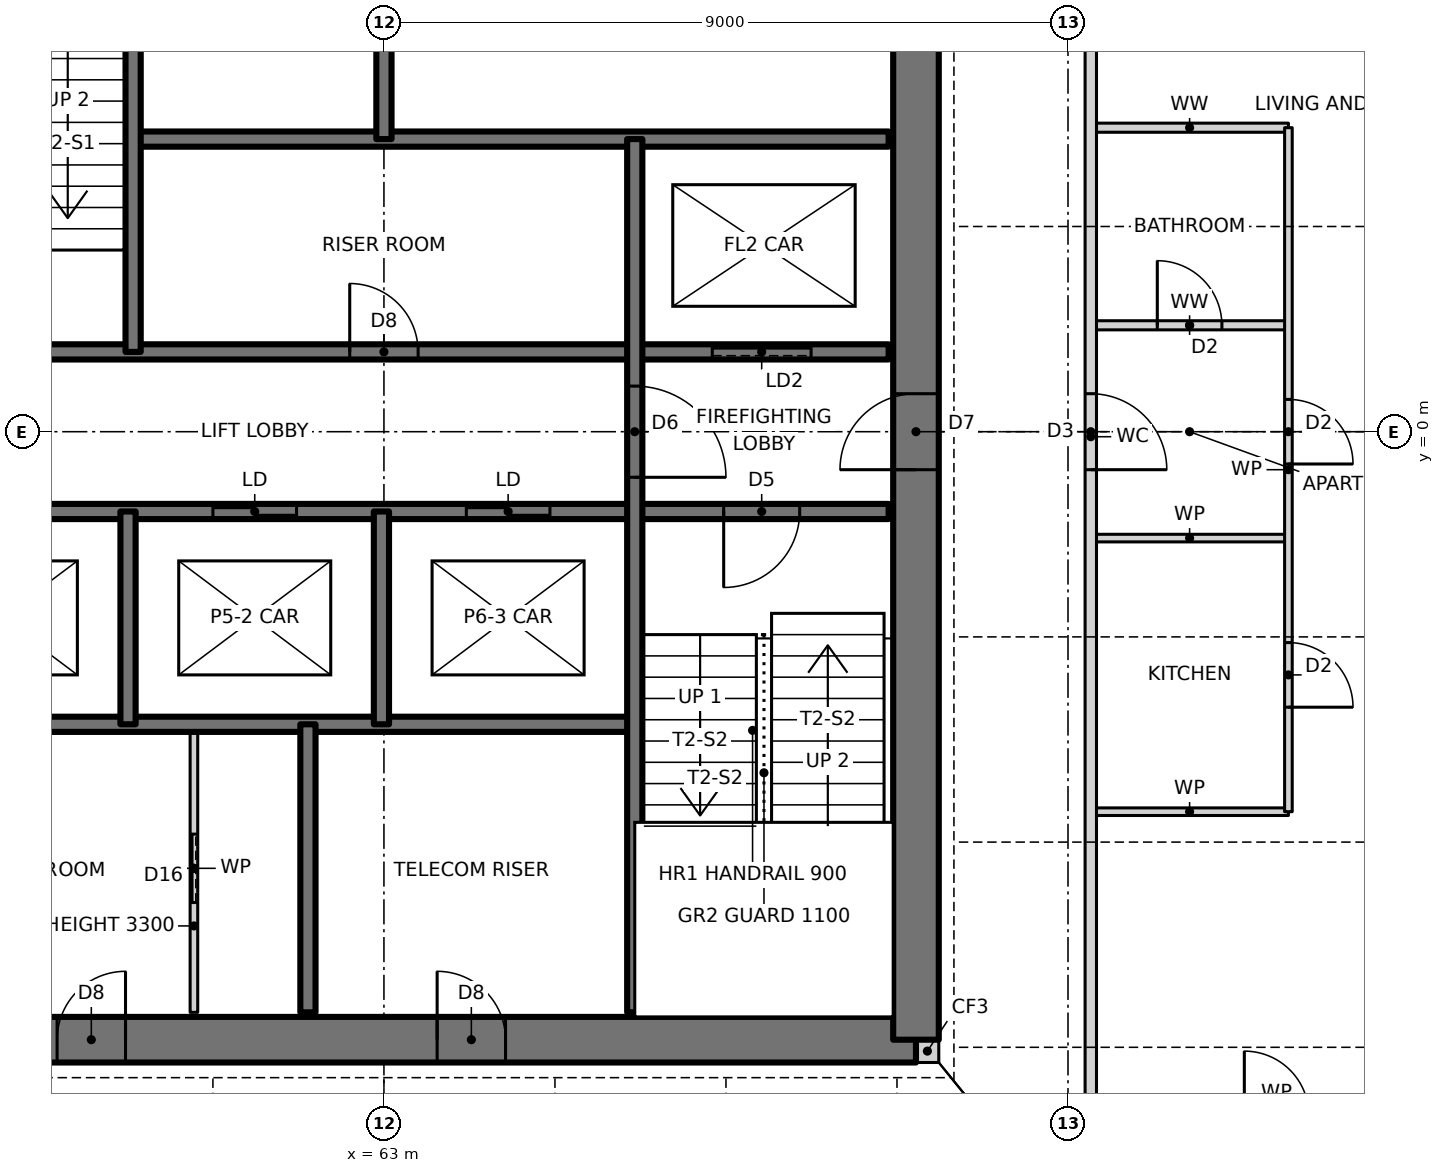
"""IFC4 building model, lengths in metres.
Left out: names, types, materials, properties, quantities, classifications, styles, units other than length and angle.
Written with IfcOpenShell. Run it as: python <this file> out.ifc"""

import sys

from ifc_helpers import new_model, si_unit, direction, frame, frame_2d, origin, place, context, subcontext, project, spatial, rectangle, extrude, element, fill, save


model = new_model("IFC4")
c1 = context("Model", 3, precision=1e-05, world=origin(), true_north=direction((0.0, 1.0)))
c2 = subcontext(c1, "Body", "Model", "MODEL_VIEW")
j1 = project(units=[si_unit("LENGTHUNIT", "METRE"), si_unit("PLANEANGLEUNIT", "RADIAN")], contexts=[c1])
p1 = place(None, origin())
s1 = spatial("IfcSite", under=j1, at=p1, CompositionType="ELEMENT")
p2 = place(p1, origin())
s2 = spatial("IfcBuilding", under=s1, at=p2, CompositionType="ELEMENT")
p3 = place(p2, frame((0.0, 0.0, 119.0)))
s3 = spatial("IfcBuildingStorey", under=s2, at=p3, CompositionType="ELEMENT", Elevation=119.0)
p4 = place(p3, frame((70.0, -8.15, 0.0), z_axis=(0.0, 0.0, 1.0), x_axis=(1.0, 0.0, 0.0)))
e1 = element("IfcWall", 1, at=p4, inside=s3, PredefinedType="SOLIDWALL", context=c2, shape_type="SweptSolid", body=[
    extrude(rectangle(XDim=0.3, YDim=0.3, at=frame_2d((0.15, 0.0))), origin(), (0.0, 0.0, 1.0), 3.5),
])
p5 = place(p3, frame((56.0, -8.0, 0.0), z_axis=(0.0, 0.0, 1.0), x_axis=(1.0, 0.0, 0.0)))
e2 = element("IfcWall", 2, at=p5, inside=s3, PredefinedType="SHEAR", context=c2, shape_type="SweptSolid", body=[
    extrude(rectangle(XDim=14.0, YDim=0.6, at=frame_2d((7.0, 0.0))), origin(), (0.0, 0.0, 1.0), 3.5),
])
p6 = place(p5, frame((2.7, 0.0, 0.0)))
e3 = element("IfcOpeningElement", 3, at=p6, cuts=e2, PredefinedType="OPENING", context=c2, shape_type="SweptSolid", body=[
    extrude(rectangle(XDim=0.9, YDim=2.1, at=frame_2d((0.45, 1.05))), frame((0.0, 0.31, 0.0), z_axis=(0.0, -1.0, 0.0), x_axis=(1.0, 0.0, 0.0)), (0.0, 0.0, 1.0), 0.62),
])
p7 = place(p5, frame((7.7, 0.0, 0.0)))
e4 = element("IfcOpeningElement", 4, at=p7, cuts=e2, PredefinedType="OPENING", context=c2, shape_type="SweptSolid", body=[
    extrude(rectangle(XDim=0.9, YDim=2.1, at=frame_2d((0.45, 1.05))), frame((0.0, 0.31, 0.0), z_axis=(0.0, -1.0, 0.0), x_axis=(1.0, 0.0, 0.0)), (0.0, 0.0, 1.0), 0.62),
])
p8 = place(p3, frame((70.0, -8.0, 0.0), z_axis=(0.0, 0.0, 1.0), x_axis=(0.0, 1.0, 0.0)))
e5 = element("IfcWall", 5, at=p8, inside=s3, PredefinedType="SHEAR", context=c2, shape_type="SweptSolid", body=[
    extrude(rectangle(XDim=16.0, YDim=0.6, at=frame_2d((8.0, 0.0))), origin(), (0.0, 0.0, 1.0), 3.5),
])
p9 = place(p8, frame((7.5, 0.0, 0.0)))
e6 = element("IfcOpeningElement", 6, at=p9, cuts=e5, PredefinedType="OPENING", context=c2, shape_type="SweptSolid", body=[
    extrude(rectangle(XDim=1.0, YDim=2.1, at=frame_2d((0.5, 1.05))), frame((0.0, 0.31, 0.0), z_axis=(0.0, -1.0, 0.0), x_axis=(1.0, 0.0, 0.0)), (0.0, 0.0, 1.0), 0.62),
])
p10 = place(p3, frame((72.3, -5.0, 0.0), z_axis=(0.0, 0.0, 1.0), x_axis=(1.0, 0.0, 0.0)))
e7 = element("IfcWall", 7, at=p10, inside=s3, PredefinedType="PARTITIONING", context=c2, shape_type="SweptSolid", body=[
    extrude(rectangle(XDim=2.6, YDim=0.1, at=frame_2d((1.3, 0.0))), origin(), (0.0, 0.0, 1.0), 3.27),
])
p11 = place(p3, frame((56.36, -3.85, 0.0), z_axis=(0.0, 0.0, 1.0), x_axis=(1.0, 0.0, 0.0)))
e8 = element("IfcWall", 8, at=p11, inside=s3, PredefinedType="SOLIDWALL", context=c2, shape_type="SweptSolid", body=[
    extrude(rectangle(XDim=9.94, YDim=0.2, at=frame_2d((4.97, 0.0))), origin(), (0.0, 0.0, 1.0), 3.5),
])
p12 = place(p3, frame((72.3, -1.4, 0.0), z_axis=(0.0, 0.0, 1.0), x_axis=(1.0, 0.0, 0.0)))
e9 = element("IfcWall", 9, at=p12, inside=s3, PredefinedType="PARTITIONING", context=c2, shape_type="SweptSolid", body=[
    extrude(rectangle(XDim=2.6, YDim=0.1, at=frame_2d((1.3, 0.0))), origin(), (0.0, 0.0, 1.0), 3.27),
])
p13 = place(p3, frame((56.36, -1.05, 0.0), z_axis=(0.0, 0.0, 1.0), x_axis=(1.0, 0.0, 0.0)))
e10 = element("IfcWall", 10, at=p13, inside=s3, PredefinedType="SOLIDWALL", context=c2, shape_type="SweptSolid", body=[
    extrude(rectangle(XDim=13.28, YDim=0.2, at=frame_2d((6.64, 0.0))), origin(), (0.0, 0.0, 1.0), 3.5),
])
p14 = place(p13, frame((11.11, 0.0, 0.0)))
e11 = element("IfcOpeningElement", 11, at=p14, cuts=e10, PredefinedType="OPENING", context=c2, shape_type="SweptSolid", body=[
    extrude(rectangle(XDim=1.0, YDim=2.1, at=frame_2d((0.5, 1.05))), frame((0.0, 0.11, 0.0), z_axis=(0.0, -1.0, 0.0), x_axis=(1.0, 0.0, 0.0)), (0.0, 0.0, 1.0), 0.22),
])
p15 = place(p13, frame((1.087, 0.0, 0.0)))
e12 = element("IfcOpeningElement", 12, at=p15, cuts=e10, PredefinedType="OPENING", context=c2, shape_type="SweptSolid", body=[
    extrude(rectangle(XDim=1.1, YDim=2.1, at=frame_2d((0.55, 1.05))), frame((0.0, 0.11, 0.0), z_axis=(0.0, -1.0, 0.0), x_axis=(1.0, 0.0, 0.0)), (0.0, 0.0, 1.0), 0.22),
])
p16 = place(p13, frame((4.39, 0.0, 0.0)))
e13 = element("IfcOpeningElement", 13, at=p16, cuts=e10, PredefinedType="OPENING", context=c2, shape_type="SweptSolid", body=[
    extrude(rectangle(XDim=1.1, YDim=2.1, at=frame_2d((0.55, 1.05))), frame((0.0, 0.11, 0.0), z_axis=(0.0, -1.0, 0.0), x_axis=(1.0, 0.0, 0.0)), (0.0, 0.0, 1.0), 0.22),
])
p17 = place(p13, frame((7.724, 0.0, 0.0)))
e14 = element("IfcOpeningElement", 14, at=p17, cuts=e10, PredefinedType="OPENING", context=c2, shape_type="SweptSolid", body=[
    extrude(rectangle(XDim=1.1, YDim=2.1, at=frame_2d((0.55, 1.05))), frame((0.0, 0.11, 0.0), z_axis=(0.0, -1.0, 0.0), x_axis=(1.0, 0.0, 0.0)), (0.0, 0.0, 1.0), 0.22),
])
p18 = place(p3, frame((56.36, 1.05, 0.0), z_axis=(0.0, 0.0, 1.0), x_axis=(1.0, 0.0, 0.0)))
e15 = element("IfcWall", 15, at=p18, inside=s3, PredefinedType="SOLIDWALL", context=c2, shape_type="SweptSolid", body=[
    extrude(rectangle(XDim=13.28, YDim=0.2, at=frame_2d((6.64, 0.0))), origin(), (0.0, 0.0, 1.0), 3.5),
])
p19 = place(p18, frame((1.17, 0.0, 0.0)))
e16 = element("IfcOpeningElement", 16, at=p19, cuts=e15, PredefinedType="OPENING", context=c2, shape_type="SweptSolid", body=[
    extrude(rectangle(XDim=1.0, YDim=2.1, at=frame_2d((0.5, 1.05))), frame((0.0, 0.11, 0.0), z_axis=(0.0, -1.0, 0.0), x_axis=(1.0, 0.0, 0.0)), (0.0, 0.0, 1.0), 0.22),
])
p20 = place(p18, frame((6.19, 0.0, 0.0)))
e17 = element("IfcOpeningElement", 17, at=p20, cuts=e15, PredefinedType="OPENING", context=c2, shape_type="SweptSolid", body=[
    extrude(rectangle(XDim=0.9, YDim=2.1, at=frame_2d((0.45, 1.05))), frame((0.0, 0.11, 0.0), z_axis=(0.0, -1.0, 0.0), x_axis=(1.0, 0.0, 0.0)), (0.0, 0.0, 1.0), 0.22),
])
p21 = place(p18, frame((10.96, 0.0, 0.0)))
e18 = element("IfcOpeningElement", 18, at=p21, cuts=e15, PredefinedType="OPENING", context=c2, shape_type="SweptSolid", body=[
    extrude(rectangle(XDim=1.3, YDim=2.1, at=frame_2d((0.65, 1.05))), frame((0.0, 0.11, 0.0), z_axis=(0.0, -1.0, 0.0), x_axis=(1.0, 0.0, 0.0)), (0.0, 0.0, 1.0), 0.22),
])
p22 = place(p3, frame((72.3, 1.4, 0.0), z_axis=(0.0, 0.0, 1.0), x_axis=(1.0, 0.0, 0.0)))
e19 = element("IfcWall", 19, at=p22, inside=s3, PredefinedType="PARTITIONING", context=c2, shape_type="SweptSolid", body=[
    extrude(rectangle(XDim=2.6, YDim=0.12, at=frame_2d((1.3, 0.0))), origin(), (0.0, 0.0, 1.0), 3.27),
])
p23 = place(p22, frame((0.875, 0.0, 0.0)))
e20 = element("IfcOpeningElement", 20, at=p23, cuts=e19, PredefinedType="OPENING", context=c2, shape_type="SweptSolid", body=[
    extrude(rectangle(XDim=0.85, YDim=2.1, at=frame_2d((0.425, 1.05))), frame((0.0, 0.07, 0.0), z_axis=(0.0, -1.0, 0.0), x_axis=(1.0, 0.0, 0.0)), (0.0, 0.0, 1.0), 0.14),
])
p24 = place(p3, frame((59.7, 3.85, 0.0), z_axis=(0.0, 0.0, 1.0), x_axis=(1.0, 0.0, 0.0)))
e21 = element("IfcWall", 21, at=p24, inside=s3, PredefinedType="SOLIDWALL", context=c2, shape_type="SweptSolid", body=[
    extrude(rectangle(XDim=9.94, YDim=0.2, at=frame_2d((4.97, 0.0))), origin(), (0.0, 0.0, 1.0), 3.5),
])
p25 = place(p3, frame((72.3, 4.0, 0.0), z_axis=(0.0, 0.0, 1.0), x_axis=(1.0, 0.0, 0.0)))
e22 = element("IfcWall", 22, at=p25, inside=s3, PredefinedType="PARTITIONING", context=c2, shape_type="SweptSolid", body=[
    extrude(rectangle(XDim=2.6, YDim=0.12, at=frame_2d((1.3, 0.0))), origin(), (0.0, 0.0, 1.0), 3.27),
])
p26 = place(p3, frame((74.9, -5.0, 0.0), z_axis=(0.0, 0.0, 1.0), x_axis=(0.0, 1.0, 0.0)))
e23 = element("IfcWall", 23, at=p26, inside=s3, PredefinedType="PARTITIONING", context=c2, shape_type="SweptSolid", body=[
    extrude(rectangle(XDim=9.0, YDim=0.1, at=frame_2d((4.5, 0.0))), origin(), (0.0, 0.0, 1.0), 3.27),
])
p27 = place(p26, frame((1.375, 0.0, 0.0)))
e24 = element("IfcOpeningElement", 24, at=p27, cuts=e23, PredefinedType="OPENING", context=c2, shape_type="SweptSolid", body=[
    extrude(rectangle(XDim=0.85, YDim=2.1, at=frame_2d((0.425, 1.05))), frame((0.0, 0.06, 0.0), z_axis=(0.0, -1.0, 0.0), x_axis=(1.0, 0.0, 0.0)), (0.0, 0.0, 1.0), 0.12),
])
p28 = place(p26, frame((4.575, 0.0, 0.0)))
e25 = element("IfcOpeningElement", 25, at=p28, cuts=e23, PredefinedType="OPENING", context=c2, shape_type="SweptSolid", body=[
    extrude(rectangle(XDim=0.85, YDim=2.1, at=frame_2d((0.425, 1.05))), frame((0.0, 0.06, 0.0), z_axis=(0.0, -1.0, 0.0), x_axis=(1.0, 0.0, 0.0)), (0.0, 0.0, 1.0), 0.12),
])
p29 = place(p3, frame((72.3, -10.9, 0.0), z_axis=(0.0, 0.0, 1.0), x_axis=(0.0, 1.0, 0.0)))
e26 = element("IfcWall", 26, at=p29, inside=s3, PredefinedType="PARTITIONING", context=c2, shape_type="SweptSolid", body=[
    extrude(rectangle(XDim=21.668, YDim=0.15, at=frame_2d((10.834, 0.0))), origin(), (0.0, 0.0, 1.0), 3.27),
])
p30 = place(p29, frame((10.4, 0.0, 0.0)))
e27 = element("IfcOpeningElement", 27, at=p30, cuts=e26, PredefinedType="OPENING", context=c2, shape_type="SweptSolid", body=[
    extrude(rectangle(XDim=1.0, YDim=2.1, at=frame_2d((0.5, 1.05))), frame((0.0, 0.085, 0.0), z_axis=(0.0, -1.0, 0.0), x_axis=(1.0, 0.0, 0.0)), (0.0, 0.0, 1.0), 0.17),
])
p31 = place(p3, frame((66.3, -7.64, 0.0), z_axis=(0.0, 0.0, 1.0), x_axis=(0.0, 1.0, 0.0)))
e28 = element("IfcWall", 28, at=p31, inside=s3, PredefinedType="SOLIDWALL", context=c2, shape_type="SweptSolid", body=[
    extrude(rectangle(XDim=11.49, YDim=0.2, at=frame_2d((5.745, 0.0))), origin(), (0.0, 0.0, 1.0), 3.5),
])
p32 = place(p31, frame((7.04, 0.0, 0.0)))
e29 = element("IfcOpeningElement", 29, at=p32, cuts=e28, PredefinedType="OPENING", context=c2, shape_type="SweptSolid", body=[
    extrude(rectangle(XDim=1.2, YDim=2.1, at=frame_2d((0.6, 1.05))), frame((0.0, 0.11, 0.0), z_axis=(0.0, -1.0, 0.0), x_axis=(1.0, 0.0, 0.0)), (0.0, 0.0, 1.0), 0.22),
])
p33 = place(p3, frame((63.0, 3.85, 0.0), z_axis=(0.0, 0.0, 1.0), x_axis=(0.0, 1.0, 0.0)))
e30 = element("IfcWall", 30, at=p33, inside=s3, PredefinedType="SOLIDWALL", context=c2, shape_type="SweptSolid", body=[
    extrude(rectangle(XDim=3.79, YDim=0.2, at=frame_2d((1.895, 0.0))), origin(), (0.0, 0.0, 1.0), 3.5),
])
p34 = place(p3, frame((62.967, -3.85, 0.0), z_axis=(0.0, 0.0, 1.0), x_axis=(0.0, 1.0, 0.0)))
e31 = element("IfcWall", 31, at=p34, inside=s3, PredefinedType="SOLIDWALL", context=c2, shape_type="SweptSolid", body=[
    extrude(rectangle(XDim=2.8, YDim=0.2, at=frame_2d((1.4, 0.0))), origin(), (0.0, 0.0, 1.0), 3.5),
])
p35 = place(p3, frame((62.0, -7.64, 0.0), z_axis=(0.0, 0.0, 1.0), x_axis=(0.0, 1.0, 0.0)))
e32 = element("IfcWall", 32, at=p35, inside=s3, PredefinedType="SOLIDWALL", context=c2, shape_type="SweptSolid", body=[
    extrude(rectangle(XDim=3.79, YDim=0.2, at=frame_2d((1.895, 0.0))), origin(), (0.0, 0.0, 1.0), 3.5),
])
p36 = place(p3, frame((60.5, -7.64, 0.0), z_axis=(0.0, 0.0, 1.0), x_axis=(0.0, 1.0, 0.0)))
e33 = element("IfcWall", 33, at=p36, inside=s3, PredefinedType="PARTITIONING", context=c2, shape_type="SweptSolid", body=[
    extrude(rectangle(XDim=3.79, YDim=0.1, at=frame_2d((1.895, 0.0))), origin(), (0.0, 0.0, 1.0), 3.3),
])
p37 = place(p36, frame((1.445, 0.0, 0.0)))
e34 = element("IfcOpeningElement", 34, at=p37, cuts=e33, PredefinedType="OPENING", context=c2, shape_type="SweptSolid", body=[
    extrude(rectangle(XDim=0.9, YDim=2.1, at=frame_2d((0.45, 1.05))), frame((0.0, 0.06, 0.0), z_axis=(0.0, -1.0, 0.0), x_axis=(1.0, 0.0, 0.0)), (0.0, 0.0, 1.0), 0.12),
])
p38 = place(p3, frame((59.7, 1.05, 0.0), z_axis=(0.0, 0.0, 1.0), x_axis=(0.0, 1.0, 0.0)))
e35 = element("IfcWall", 35, at=p38, inside=s3, PredefinedType="SOLIDWALL", context=c2, shape_type="SweptSolid", body=[
    extrude(rectangle(XDim=6.59, YDim=0.2, at=frame_2d((3.295, 0.0))), origin(), (0.0, 0.0, 1.0), 3.5),
])
p39 = place(p3, frame((59.633, -3.85, 0.0), z_axis=(0.0, 0.0, 1.0), x_axis=(0.0, 1.0, 0.0)))
e36 = element("IfcWall", 36, at=p39, inside=s3, PredefinedType="SOLIDWALL", context=c2, shape_type="SweptSolid", body=[
    extrude(rectangle(XDim=2.8, YDim=0.2, at=frame_2d((1.4, 0.0))), origin(), (0.0, 0.0, 1.0), 3.5),
])
p40 = place(p14, frame((1.0, 0.0, 0.0), z_axis=(0.0, 0.0, 1.0), x_axis=(-1.0, 0.0, 0.0)))
e37 = element("IfcDoor", 37, at=p40, inside=s3, OperationType="SINGLE_SWING_RIGHT", PredefinedType="DOOR", context=c2, shape_type="SweptSolid", body=[
    extrude(rectangle(XDim=1.0, YDim=2.1, at=frame_2d((0.5, 1.05))), frame((0.0, 0.025, 0.0), z_axis=(0.0, -1.0, 0.0), x_axis=(1.0, 0.0, 0.0)), (0.0, 0.0, 1.0), 0.05),
])
fill(e11, e37)
p41 = place(p32, frame((1.2, 0.0, 0.0), z_axis=(0.0, 0.0, 1.0), x_axis=(-1.0, 0.0, 0.0)))
e38 = element("IfcDoor", 38, at=p41, inside=s3, OperationType="SINGLE_SWING_RIGHT", PredefinedType="DOOR", context=c2, shape_type="SweptSolid", body=[
    extrude(rectangle(XDim=1.2, YDim=2.1, at=frame_2d((0.6, 1.05))), frame((0.0, 0.025, 0.0), z_axis=(0.0, -1.0, 0.0), x_axis=(1.0, 0.0, 0.0)), (0.0, 0.0, 1.0), 0.05),
])
fill(e29, e38)
p42 = place(p20, origin())
e39 = element("IfcDoor", 39, at=p42, inside=s3, OperationType="SINGLE_SWING_LEFT", PredefinedType="DOOR", context=c2, shape_type="SweptSolid", body=[
    extrude(rectangle(XDim=0.9, YDim=2.1, at=frame_2d((0.45, 1.05))), frame((0.0, 0.025, 0.0), z_axis=(0.0, -1.0, 0.0), x_axis=(1.0, 0.0, 0.0)), (0.0, 0.0, 1.0), 0.05),
])
fill(e17, e39)
p43 = place(p37, origin())
e40 = element("IfcDoor", 40, at=p43, inside=s3, OperationType="SLIDING_TO_LEFT", PredefinedType="DOOR", context=c2, shape_type="SweptSolid", body=[
    extrude(rectangle(XDim=0.9, YDim=2.1, at=frame_2d((0.45, 1.05))), frame((0.0, 0.025, 0.0), z_axis=(0.0, -1.0, 0.0), x_axis=(1.0, 0.0, 0.0)), (0.0, 0.0, 1.0), 0.05),
])
fill(e34, e40)
p44 = place(p27, frame((0.85, 0.0, 0.0), z_axis=(0.0, 0.0, 1.0), x_axis=(-1.0, 0.0, 0.0)))
e41 = element("IfcDoor", 41, at=p44, inside=s3, OperationType="SINGLE_SWING_RIGHT", PredefinedType="DOOR", context=c2, shape_type="SweptSolid", body=[
    extrude(rectangle(XDim=0.85, YDim=2.1, at=frame_2d((0.425, 1.05))), frame((0.0, 0.025, 0.0), z_axis=(0.0, -1.0, 0.0), x_axis=(1.0, 0.0, 0.0)), (0.0, 0.0, 1.0), 0.05),
])
fill(e24, e41)
p45 = place(p30, frame((1.0, 0.0, 0.0), z_axis=(0.0, 0.0, 1.0), x_axis=(-1.0, 0.0, 0.0)))
e42 = element("IfcDoor", 42, at=p45, inside=s3, OperationType="SINGLE_SWING_RIGHT", PredefinedType="DOOR", context=c2, shape_type="SweptSolid", body=[
    extrude(rectangle(XDim=1.0, YDim=2.1, at=frame_2d((0.5, 1.05))), frame((0.0, 0.025, 0.0), z_axis=(0.0, -1.0, 0.0), x_axis=(1.0, 0.0, 0.0)), (0.0, 0.0, 1.0), 0.05),
])
fill(e27, e42)
p46 = place(p28, frame((0.85, 0.0, 0.0), z_axis=(0.0, 0.0, 1.0), x_axis=(-1.0, 0.0, 0.0)))
e43 = element("IfcDoor", 43, at=p46, inside=s3, OperationType="SINGLE_SWING_RIGHT", PredefinedType="DOOR", context=c2, shape_type="SweptSolid", body=[
    extrude(rectangle(XDim=0.85, YDim=2.1, at=frame_2d((0.425, 1.05))), frame((0.0, 0.025, 0.0), z_axis=(0.0, -1.0, 0.0), x_axis=(1.0, 0.0, 0.0)), (0.0, 0.0, 1.0), 0.05),
])
fill(e25, e43)
p47 = place(p23, origin())
e44 = element("IfcDoor", 44, at=p47, inside=s3, OperationType="SINGLE_SWING_LEFT", PredefinedType="DOOR", context=c2, shape_type="SweptSolid", body=[
    extrude(rectangle(XDim=0.85, YDim=2.1, at=frame_2d((0.425, 1.05))), frame((0.0, 0.025, 0.0), z_axis=(0.0, -1.0, 0.0), x_axis=(1.0, 0.0, 0.0)), (0.0, 0.0, 1.0), 0.05),
])
fill(e20, e44)
p48 = place(p9, origin())
e45 = element("IfcDoor", 45, at=p48, inside=s3, OperationType="SINGLE_SWING_LEFT", PredefinedType="DOOR", context=c2, shape_type="SweptSolid", body=[
    extrude(rectangle(XDim=1.0, YDim=2.1, at=frame_2d((0.5, 1.05))), frame((0.0, 0.025, 0.0), z_axis=(0.0, -1.0, 0.0), x_axis=(1.0, 0.0, 0.0)), (0.0, 0.0, 1.0), 0.05),
])
fill(e6, e45)
p49 = place(p6, origin())
e46 = element("IfcDoor", 46, at=p49, inside=s3, OperationType="SINGLE_SWING_RIGHT", PredefinedType="DOOR", context=c2, shape_type="SweptSolid", body=[
    extrude(rectangle(XDim=0.9, YDim=2.1, at=frame_2d((0.45, 1.05))), frame((0.0, 0.025, 0.0), z_axis=(0.0, -1.0, 0.0), x_axis=(1.0, 0.0, 0.0)), (0.0, 0.0, 1.0), 0.05),
])
fill(e3, e46)
p50 = place(p7, origin())
e47 = element("IfcDoor", 47, at=p50, inside=s3, OperationType="SINGLE_SWING_LEFT", PredefinedType="DOOR", context=c2, shape_type="SweptSolid", body=[
    extrude(rectangle(XDim=0.9, YDim=2.1, at=frame_2d((0.45, 1.05))), frame((0.0, 0.025, 0.0), z_axis=(0.0, -1.0, 0.0), x_axis=(1.0, 0.0, 0.0)), (0.0, 0.0, 1.0), 0.05),
])
fill(e4, e47)
p51 = place(p16, origin())
e48 = element("IfcDoor", 48, at=p51, inside=s3, OperationType="DOUBLE_DOOR_SLIDING", PredefinedType="DOOR", context=c2, shape_type="SweptSolid", body=[
    extrude(rectangle(XDim=1.1, YDim=2.1, at=frame_2d((0.55, 1.05))), frame((0.0, 0.025, 0.0), z_axis=(0.0, -1.0, 0.0), x_axis=(1.0, 0.0, 0.0)), (0.0, 0.0, 1.0), 0.05),
])
fill(e13, e48)
p52 = place(p17, origin())
e49 = element("IfcDoor", 49, at=p52, inside=s3, OperationType="DOUBLE_DOOR_SLIDING", PredefinedType="DOOR", context=c2, shape_type="SweptSolid", body=[
    extrude(rectangle(XDim=1.1, YDim=2.1, at=frame_2d((0.55, 1.05))), frame((0.0, 0.025, 0.0), z_axis=(0.0, -1.0, 0.0), x_axis=(1.0, 0.0, 0.0)), (0.0, 0.0, 1.0), 0.05),
])
fill(e14, e49)
p53 = place(p21, origin())
e50 = element("IfcDoor", 50, at=p53, inside=s3, OperationType="SLIDING_TO_LEFT", PredefinedType="DOOR", context=c2, shape_type="SweptSolid", body=[
    extrude(rectangle(XDim=1.3, YDim=2.1, at=frame_2d((0.65, 1.05))), frame((0.0, 0.025, 0.0), z_axis=(0.0, -1.0, 0.0), x_axis=(1.0, 0.0, 0.0)), (0.0, 0.0, 1.0), 0.05),
])
fill(e18, e50)
save(model, sys.argv[1])
